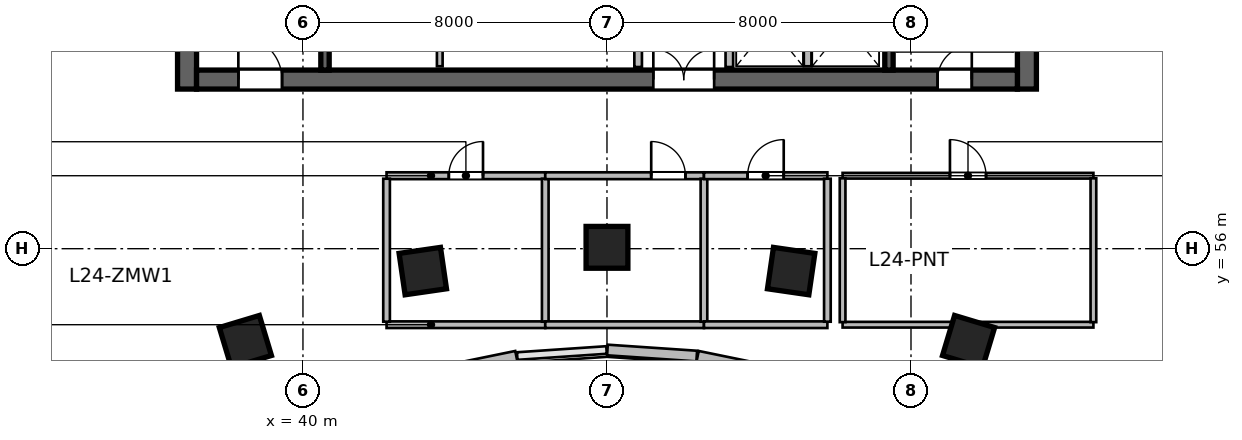
"""IFC4 building model, lengths in metres.
Left out: names, types, materials, properties, quantities, classifications, styles, units other than length and angle.
Written with IfcOpenShell. Run it as: python <this file> out.ifc"""

import sys

from ifc_helpers import new_model, si_unit, direction, frame, frame_2d, origin, origin_2d, place, context, subcontext, project, spatial, rectangle, extrude, source, transform, mapped, element, fill, save


model = new_model("IFC4")
c1 = context("Model", 3, precision=1e-05, world=origin(), true_north=direction((0.0, 1.0)))
c2 = subcontext(c1, "Body", "Model", "MODEL_VIEW")
j1 = project(units=[si_unit("LENGTHUNIT", "METRE"), si_unit("PLANEANGLEUNIT", "RADIAN")], contexts=[c1])
p1 = place(None, origin())
s1 = spatial("IfcSite", under=j1, at=p1, CompositionType="ELEMENT")
p2 = place(p1, origin())
s2 = spatial("IfcBuilding", under=s1, at=p2, CompositionType="ELEMENT")
p3 = place(p2, frame((0.0, 0.0, 103.8)))
s3 = spatial("IfcBuildingStorey", under=s2, at=p3, CompositionType="ELEMENT", Elevation=103.8)
m1 = source(origin(), c2, "Body", "SweptSolid", [
    extrude(rectangle(XDim=12.0, YDim=0.5, at=frame_2d((6.0, 0.0))), origin(), (0.0, 0.0, 1.0), 3.9),
])
for number, where, z_axis, x_axis in (
    (1, (36.95, 60.2, 0.0), (0.0, 0.0, 1.0), (0.0, 1.0, 0.0)),
    (2, (59.05, 60.2, 0.0), (0.0, 0.0, 1.0), (0.0, 1.0, 0.0)),
):
    element("IfcWall", number, at=place(p3, frame(where, z_axis=z_axis, x_axis=x_axis)), inside=s3, PredefinedType="SHEAR", context=c2, shape_type="MappedRepresentation", body=[
        mapped(m1, transform((0.0, 0.0, 0.0), scale=1.0)),
    ])
m2 = source(origin(), c2, "Body", "SweptSolid", [
    extrude(rectangle(XDim=21.6, YDim=0.5, at=frame_2d((10.8, 0.0))), origin(), (0.0, 0.0, 1.0), 3.9),
])
p4 = place(p3, frame((37.2, 60.45, 0.0), z_axis=(0.0, 0.0, 1.0), x_axis=(1.0, 0.0, 0.0)))
e3 = element("IfcWall", 3, at=p4, inside=s3, PredefinedType="SHEAR", context=c2, shape_type="MappedRepresentation", body=[
    mapped(m2, transform((0.0, 0.0, 0.0), scale=1.0)),
])
p5 = place(p4, frame((1.1, 0.0, 0.0)))
e4 = element("IfcOpeningElement", 4, at=p5, cuts=e3, PredefinedType="OPENING", context=c2, shape_type="SweptSolid", body=[
    extrude(rectangle(XDim=1.15, YDim=2.15, at=frame_2d((0.575, 1.075))), frame((0.0, 0.26, 0.0), z_axis=(0.0, -1.0, 0.0), x_axis=(1.0, 0.0, 0.0)), (0.0, 0.0, 1.0), 0.52),
])
p6 = place(p4, frame((19.5, 0.0, 0.0)))
e5 = element("IfcOpeningElement", 5, at=p6, cuts=e3, PredefinedType="OPENING", context=c2, shape_type="SweptSolid", body=[
    extrude(rectangle(XDim=0.9, YDim=2.1, at=frame_2d((0.45, 1.05))), frame((0.0, 0.26, 0.0), z_axis=(0.0, -1.0, 0.0), x_axis=(1.0, 0.0, 0.0)), (0.0, 0.0, 1.0), 0.52),
])
p7 = place(p4, frame((12.02, 0.0, 0.0)))
e6 = element("IfcOpeningElement", 6, at=p7, cuts=e3, PredefinedType="OPENING", context=c2, shape_type="SweptSolid", body=[
    extrude(rectangle(XDim=1.6, YDim=2.15, at=frame_2d((0.8, 1.075))), frame((0.0, 0.26, 0.0), z_axis=(0.0, -1.0, 0.0), x_axis=(1.0, 0.0, 0.0)), (0.0, 0.0, 1.0), 0.52),
])
m3 = source(origin(), c2, "Body", "SweptSolid", [
    extrude(rectangle(XDim=11.0, YDim=0.22, at=frame_2d((5.5, 0.0))), origin(), (0.0, 0.0, 1.0), 3.9),
])
p8 = place(p3, frame((40.58, 60.7, 0.0), z_axis=(0.0, 0.0, 1.0), x_axis=(0.0, 1.0, 0.0)))
e7 = element("IfcWall", 7, at=p8, inside=s3, PredefinedType="SHEAR", context=c2, shape_type="MappedRepresentation", body=[
    mapped(m3, transform((0.0, 0.0, 0.0), scale=1.0)),
])
p9 = place(p3, frame((55.42, 60.7, 0.0), z_axis=(0.0, 0.0, 1.0), x_axis=(0.0, 1.0, 0.0)))
e8 = element("IfcWall", 8, at=p9, inside=s3, PredefinedType="SHEAR", context=c2, shape_type="MappedRepresentation", body=[
    mapped(m3, transform((0.0, 0.0, 0.0), scale=1.0)),
])
p10 = place(p9, frame((9.545, 0.0, 0.0)))
e9 = element("IfcOpeningElement", 9, at=p10, cuts=e8, PredefinedType="OPENING", context=c2, shape_type="SweptSolid", body=[
    extrude(rectangle(XDim=1.15, YDim=2.15, at=frame_2d((0.575, 1.075))), frame((0.0, 0.12, 0.0), z_axis=(0.0, -1.0, 0.0), x_axis=(1.0, 0.0, 0.0)), (0.0, 0.0, 1.0), 0.24),
])
m4 = source(origin(), c2, "Body", "SweptSolid", [
    extrude(rectangle(XDim=1.1, YDim=1.1, at=origin_2d()), origin(), (0.0, 0.0, 1.0), 3.9),
])
for number, where, z_axis, x_axis in (
    (10, (38.485, 53.558, 0.0), (0.0, 0.0, 1.0), (-0.289, 0.957, 0.0)),
    (11, (43.154, 55.411, 0.0), (0.0, 0.0, 1.0), (-0.143, 0.99, 0.0)),
    (12, (48.0, 56.036, 0.0), (0.0, 0.0, 1.0), (0.0, 1.0, 0.0)),
    (13, (52.846, 55.411, 0.0), (0.0, 0.0, 1.0), (0.143, 0.99, 0.0)),
    (14, (57.515, 53.558, 0.0), (0.0, 0.0, 1.0), (0.289, 0.957, 0.0)),
):
    element("IfcColumn", number, at=place(p3, frame(where, z_axis=z_axis, x_axis=x_axis)), inside=s3, PredefinedType="COLUMN", context=c2, shape_type="MappedRepresentation", body=[
        mapped(m4, transform((0.0, 0.0, 0.0), scale=1.0)),
    ])
m5 = source(origin(), c2, "Body", "SweptSolid", [
    extrude(rectangle(XDim=2.374, YDim=0.28, at=frame_2d((1.187, 0.0))), origin(), (0.0, 0.0, 1.0), 3.65),
])
p11 = place(p3, frame((52.711, 52.695, 0.0), z_axis=(0.0, 0.0, 1.0), x_axis=(-0.979619827472, 0.200860632341, 0.0)))
e15 = element("IfcWall", 15, at=p11, inside=s3, PredefinedType="SOLIDWALL", context=c2, shape_type="MappedRepresentation", body=[
    mapped(m5, transform((0.0, 0.0, 0.0), scale=1.0)),
])
m6 = source(origin(), c2, "Body", "SweptSolid", [
    extrude(rectangle(XDim=2.355, YDim=0.28, at=frame_2d((1.177, 0.0))), origin(), (0.0, 0.0, 1.0), 3.65),
])
p12 = place(p3, frame((50.362, 53.175, 0.0), z_axis=(0.0, 0.0, 1.0), x_axis=(-0.997699017577, 0.067798748701, 0.0)))
e16 = element("IfcWall", 16, at=p12, inside=s3, PredefinedType="SOLIDWALL", context=c2, shape_type="MappedRepresentation", body=[
    mapped(m6, transform((0.0, 0.0, 0.0), scale=1.0)),
])
p13 = place(p3, frame((45.614, 53.172, 0.0), z_axis=(0.0, 0.0, 1.0), x_axis=(-0.979619827472, -0.200860632341, 0.0)))
e17 = element("IfcWall", 17, at=p13, inside=s3, PredefinedType="SOLIDWALL", context=c2, shape_type="MappedRepresentation", body=[
    mapped(m5, transform((0.0, 0.0, 0.0), scale=1.0)),
])
m7 = source(origin(), c2, "Body", "SweptSolid", [
    extrude(rectangle(XDim=2.24, YDim=0.2, at=frame_2d((1.12, 0.0))), origin(), (0.0, 0.0, 1.0), 3.65),
])
for number, where, z_axis, x_axis in (
    (18, (48.82, 60.78, 0.0), (0.0, 0.0, 1.0), (0.0, 1.0, 0.0)),
    (19, (51.22, 60.78, 0.0), (0.0, 0.0, 1.0), (0.0, 1.0, 0.0)),
):
    element("IfcWall", number, at=place(p3, frame(where, z_axis=z_axis, x_axis=x_axis)), inside=s3, PredefinedType="SOLIDWALL", context=c2, shape_type="MappedRepresentation", body=[
        mapped(m7, transform((0.0, 0.0, 0.0), scale=1.0)),
    ])
m8 = source(origin(), c2, "Body", "SweptSolid", [
    extrude(rectangle(XDim=2.2, YDim=0.15, at=frame_2d((1.1, 0.0))), origin(), (0.0, 0.0, 1.0), 3.65),
])
p14 = place(p3, frame((43.6, 60.8, 0.0), z_axis=(0.0, 0.0, 1.0), x_axis=(0.0, 1.0, 0.0)))
e20 = element("IfcWall", 20, at=p14, inside=s3, PredefinedType="PARTITIONING", context=c2, shape_type="MappedRepresentation", body=[
    mapped(m8, transform((0.0, 0.0, 0.0), scale=1.0)),
])
m9 = source(origin(), c2, "Body", "SweptSolid", [
    extrude(rectangle(XDim=2.2, YDim=0.2, at=frame_2d((1.1, 0.0))), origin(), (0.0, 0.0, 1.0), 3.65),
])
p15 = place(p3, frame((53.28, 60.8, 0.0), z_axis=(0.0, 0.0, 1.0), x_axis=(0.0, 1.0, 0.0)))
e21 = element("IfcWall", 21, at=p15, inside=s3, PredefinedType="SOLIDWALL", context=c2, shape_type="MappedRepresentation", body=[
    mapped(m9, transform((0.0, 0.0, 0.0), scale=1.0)),
])
m10 = source(origin(), c2, "Body", "SweptSolid", [
    extrude(rectangle(XDim=4.176, YDim=0.175, at=frame_2d((2.088, 0.0))), origin(), (0.0, 0.0, 1.0), 3.65),
])
p16 = place(p3, frame((42.2, 54.0, 0.0), z_axis=(0.0, 0.0, 1.0), x_axis=(1.0, 0.0, 0.0)))
e22 = element("IfcWall", 22, at=p16, inside=s3, PredefinedType="PARTITIONING", context=c2, shape_type="MappedRepresentation", body=[
    mapped(m10, transform((0.0, 0.0, 0.0), scale=1.0)),
])
m11 = source(origin(), c2, "Body", "SweptSolid", [
    extrude(rectangle(XDim=4.176, YDim=0.18, at=frame_2d((2.088, 0.0))), origin(), (0.0, 0.0, 1.0), 3.65),
])
p17 = place(p3, frame((42.2, 57.92, 0.0), z_axis=(0.0, 0.0, 1.0), x_axis=(1.0, 0.0, 0.0)))
e23 = element("IfcWall", 23, at=p17, inside=s3, PredefinedType="PLUMBINGWALL", context=c2, shape_type="MappedRepresentation", body=[
    mapped(m11, transform((0.0, 0.0, 0.0), scale=1.0)),
])
p18 = place(p17, frame((1.638, 0.0, 0.0)))
e24 = element("IfcOpeningElement", 24, at=p18, cuts=e23, PredefinedType="OPENING", context=c2, shape_type="SweptSolid", body=[
    extrude(rectangle(XDim=0.9, YDim=2.08, at=frame_2d((0.45, 1.04))), frame((0.0, 0.1, 0.0), z_axis=(0.0, -1.0, 0.0), x_axis=(1.0, 0.0, 0.0)), (0.0, 0.0, 1.0), 0.2),
])
m12 = source(origin(), c2, "Body", "SweptSolid", [
    extrude(rectangle(XDim=3.763, YDim=0.175, at=frame_2d((1.881, 0.0))), origin(), (0.0, 0.0, 1.0), 3.65),
])
for number, where, z_axis, x_axis in (
    (25, (42.2, 54.079, 0.0), (0.0, 0.0, 1.0), (0.0, 1.0, 0.0)),
    (26, (46.376, 54.079, 0.0), (0.0, 0.0, 1.0), (0.0, 1.0, 0.0)),
):
    element("IfcWall", number, at=place(p3, frame(where, z_axis=z_axis, x_axis=x_axis)), inside=s3, PredefinedType="PARTITIONING", context=c2, shape_type="MappedRepresentation", body=[
        mapped(m12, transform((0.0, 0.0, 0.0), scale=1.0)),
    ])
p19 = place(p3, frame((46.376, 54.0, 0.0), z_axis=(0.0, 0.0, 1.0), x_axis=(1.0, 0.0, 0.0)))
e27 = element("IfcWall", 27, at=p19, inside=s3, PredefinedType="PARTITIONING", context=c2, shape_type="MappedRepresentation", body=[
    mapped(m10, transform((0.0, 0.0, 0.0), scale=1.0)),
])
p20 = place(p3, frame((46.376, 57.92, 0.0), z_axis=(0.0, 0.0, 1.0), x_axis=(1.0, 0.0, 0.0)))
e28 = element("IfcWall", 28, at=p20, inside=s3, PredefinedType="PLUMBINGWALL", context=c2, shape_type="MappedRepresentation", body=[
    mapped(m11, transform((0.0, 0.0, 0.0), scale=1.0)),
])
p21 = place(p20, frame((2.788, 0.0, 0.0)))
e29 = element("IfcOpeningElement", 29, at=p21, cuts=e28, PredefinedType="OPENING", context=c2, shape_type="SweptSolid", body=[
    extrude(rectangle(XDim=0.9, YDim=2.08, at=frame_2d((0.45, 1.04))), frame((0.0, 0.1, 0.0), z_axis=(0.0, -1.0, 0.0), x_axis=(1.0, 0.0, 0.0)), (0.0, 0.0, 1.0), 0.2),
])
p22 = place(p3, frame((50.552, 54.079, 0.0), z_axis=(0.0, 0.0, 1.0), x_axis=(0.0, 1.0, 0.0)))
e30 = element("IfcWall", 30, at=p22, inside=s3, PredefinedType="PARTITIONING", context=c2, shape_type="MappedRepresentation", body=[
    mapped(m12, transform((0.0, 0.0, 0.0), scale=1.0)),
])
m13 = source(origin(), c2, "Body", "SweptSolid", [
    extrude(rectangle(XDim=3.248, YDim=0.175, at=frame_2d((1.624, 0.0))), origin(), (0.0, 0.0, 1.0), 3.65),
])
p23 = place(p3, frame((50.552, 54.0, 0.0), z_axis=(0.0, 0.0, 1.0), x_axis=(1.0, 0.0, 0.0)))
e31 = element("IfcWall", 31, at=p23, inside=s3, PredefinedType="PARTITIONING", context=c2, shape_type="MappedRepresentation", body=[
    mapped(m13, transform((0.0, 0.0, 0.0), scale=1.0)),
])
m14 = source(origin(), c2, "Body", "SweptSolid", [
    extrude(rectangle(XDim=3.248, YDim=0.18, at=frame_2d((1.624, 0.0))), origin(), (0.0, 0.0, 1.0), 3.65),
])
p24 = place(p3, frame((50.552, 57.92, 0.0), z_axis=(0.0, 0.0, 1.0), x_axis=(1.0, 0.0, 0.0)))
e32 = element("IfcWall", 32, at=p24, inside=s3, PredefinedType="PLUMBINGWALL", context=c2, shape_type="MappedRepresentation", body=[
    mapped(m14, transform((0.0, 0.0, 0.0), scale=1.0)),
])
p25 = place(p24, frame((1.149, 0.0, 0.0)))
e33 = element("IfcOpeningElement", 33, at=p25, cuts=e32, PredefinedType="OPENING", context=c2, shape_type="SweptSolid", body=[
    extrude(rectangle(XDim=0.95, YDim=2.12, at=frame_2d((0.475, 1.06))), frame((0.0, 0.1, 0.0), z_axis=(0.0, -1.0, 0.0), x_axis=(1.0, 0.0, 0.0)), (0.0, 0.0, 1.0), 0.2),
])
p26 = place(p3, frame((53.8, 54.079, 0.0), z_axis=(0.0, 0.0, 1.0), x_axis=(0.0, 1.0, 0.0)))
e34 = element("IfcWall", 34, at=p26, inside=s3, PredefinedType="PARTITIONING", context=c2, shape_type="MappedRepresentation", body=[
    mapped(m12, transform((0.0, 0.0, 0.0), scale=1.0)),
])
m15 = source(origin(), c2, "Body", "SweptSolid", [
    extrude(rectangle(XDim=6.6, YDim=0.15, at=frame_2d((3.3, 0.0))), origin(), (0.0, 0.0, 1.0), 3.095),
])
p27 = place(p3, frame((54.2, 54.0, 0.0), z_axis=(0.0, 0.0, 1.0), x_axis=(1.0, 0.0, 0.0)))
e35 = element("IfcWall", 35, at=p27, inside=s3, PredefinedType="PARTITIONING", context=c2, shape_type="MappedRepresentation", body=[
    mapped(m15, transform((0.0, 0.0, 0.0), scale=1.0)),
])
m16 = source(origin(), c2, "Body", "SweptSolid", [
    extrude(rectangle(XDim=6.6, YDim=0.15, at=frame_2d((3.3, 0.0))), origin(), (0.0, 0.0, 1.0), 3.65),
])
p28 = place(p3, frame((54.2, 57.92, 0.0), z_axis=(0.0, 0.0, 1.0), x_axis=(1.0, 0.0, 0.0)))
e36 = element("IfcWall", 36, at=p28, inside=s3, PredefinedType="PARTITIONING", context=c2, shape_type="MappedRepresentation", body=[
    mapped(m16, transform((0.0, 0.0, 0.0), scale=1.0)),
])
p29 = place(p28, frame((2.825, 0.0, 0.0)))
e37 = element("IfcOpeningElement", 37, at=p29, cuts=e36, PredefinedType="OPENING", context=c2, shape_type="SweptSolid", body=[
    extrude(rectangle(XDim=0.95, YDim=2.1, at=frame_2d((0.475, 1.05))), frame((0.0, 0.085, 0.0), z_axis=(0.0, -1.0, 0.0), x_axis=(1.0, 0.0, 0.0)), (0.0, 0.0, 1.0), 0.17),
])
m17 = source(origin(), c2, "Body", "SweptSolid", [
    extrude(rectangle(XDim=3.785, YDim=0.15, at=frame_2d((1.893, 0.0))), origin(), (0.0, 0.0, 1.0), 3.65),
])
for number, where, z_axis, x_axis in (
    (38, (54.2, 54.067, 0.0), (0.0, 0.0, 1.0), (0.0, 1.0, 0.0)),
    (39, (60.8, 54.067, 0.0), (0.0, 0.0, 1.0), (0.0, 1.0, 0.0)),
):
    element("IfcWall", number, at=place(p3, frame(where, z_axis=z_axis, x_axis=x_axis)), inside=s3, PredefinedType="PARTITIONING", context=c2, shape_type="MappedRepresentation", body=[
        mapped(m17, transform((0.0, 0.0, 0.0), scale=1.0)),
    ])
m18 = source(origin(), c2, "Body", "SweptSolid", [
    extrude(rectangle(XDim=1.15, YDim=2.15, at=frame_2d((0.575, 1.075))), frame((0.0, 0.025, 0.0), z_axis=(0.0, -1.0, 0.0), x_axis=(1.0, 0.0, 0.0)), (0.0, 0.0, 1.0), 0.05),
])
p30 = place(p5, origin())
e40 = element("IfcDoor", 40, at=p30, inside=s3, OperationType="SINGLE_SWING_LEFT", PredefinedType="DOOR", context=c2, shape_type="MappedRepresentation", body=[
    mapped(m18, transform((0.0, 0.0, 0.0), scale=1.0)),
])
fill(e4, e40)
m19 = source(origin(), c2, "Body", "SweptSolid", [
    extrude(rectangle(XDim=0.9, YDim=2.1, at=frame_2d((0.45, 1.05))), frame((0.0, 0.025, 0.0), z_axis=(0.0, -1.0, 0.0), x_axis=(1.0, 0.0, 0.0)), (0.0, 0.0, 1.0), 0.05),
])
p31 = place(p6, origin())
e41 = element("IfcDoor", 41, at=p31, inside=s3, OperationType="SINGLE_SWING_RIGHT", PredefinedType="DOOR", context=c2, shape_type="MappedRepresentation", body=[
    mapped(m19, transform((0.0, 0.0, 0.0), scale=1.0)),
])
fill(e5, e41)
m20 = source(origin(), c2, "Body", "SweptSolid", [
    extrude(rectangle(XDim=1.6, YDim=2.15, at=frame_2d((0.8, 1.075))), frame((0.0, 0.025, 0.0), z_axis=(0.0, -1.0, 0.0), x_axis=(1.0, 0.0, 0.0)), (0.0, 0.0, 1.0), 0.05),
])
p32 = place(p7, origin())
e42 = element("IfcDoor", 42, at=p32, inside=s3, OperationType="DOUBLE_DOOR_SINGLE_SWING", PredefinedType="DOOR", context=c2, shape_type="MappedRepresentation", body=[
    mapped(m20, transform((0.0, 0.0, 0.0), scale=1.0)),
])
fill(e6, e42)
m21 = source(origin(), c2, "Body", "SweptSolid", [
    extrude(rectangle(XDim=0.9, YDim=2.08, at=frame_2d((0.45, 1.04))), frame((0.0, 0.025, 0.0), z_axis=(0.0, -1.0, 0.0), x_axis=(1.0, 0.0, 0.0)), (0.0, 0.0, 1.0), 0.05),
])
p33 = place(p18, origin())
e43 = element("IfcDoor", 43, at=p33, inside=s3, OperationType="SINGLE_SWING_RIGHT", PredefinedType="DOOR", context=c2, shape_type="MappedRepresentation", body=[
    mapped(m21, transform((0.0, 0.0, 0.0), scale=1.0)),
])
fill(e24, e43)
p34 = place(p21, origin())
e44 = element("IfcDoor", 44, at=p34, inside=s3, OperationType="SINGLE_SWING_LEFT", PredefinedType="DOOR", context=c2, shape_type="MappedRepresentation", body=[
    mapped(m21, transform((0.0, 0.0, 0.0), scale=1.0)),
])
fill(e29, e44)
m22 = source(origin(), c2, "Body", "SweptSolid", [
    extrude(rectangle(XDim=0.95, YDim=2.12, at=frame_2d((0.475, 1.06))), frame((0.0, 0.025, 0.0), z_axis=(0.0, -1.0, 0.0), x_axis=(1.0, 0.0, 0.0)), (0.0, 0.0, 1.0), 0.05),
])
p35 = place(p25, origin())
e45 = element("IfcDoor", 45, at=p35, inside=s3, OperationType="SINGLE_SWING_RIGHT", PredefinedType="DOOR", context=c2, shape_type="MappedRepresentation", body=[
    mapped(m22, transform((0.0, 0.0, 0.0), scale=1.0)),
])
fill(e33, e45)
m23 = source(origin(), c2, "Body", "SweptSolid", [
    extrude(rectangle(XDim=0.95, YDim=2.1, at=frame_2d((0.475, 1.05))), frame((0.0, 0.025, 0.0), z_axis=(0.0, -1.0, 0.0), x_axis=(1.0, 0.0, 0.0)), (0.0, 0.0, 1.0), 0.05),
])
p36 = place(p29, origin())
e46 = element("IfcDoor", 46, at=p36, inside=s3, OperationType="SINGLE_SWING_LEFT", PredefinedType="DOOR", context=c2, shape_type="MappedRepresentation", body=[
    mapped(m23, transform((0.0, 0.0, 0.0), scale=1.0)),
])
fill(e37, e46)
save(model, sys.argv[1])
